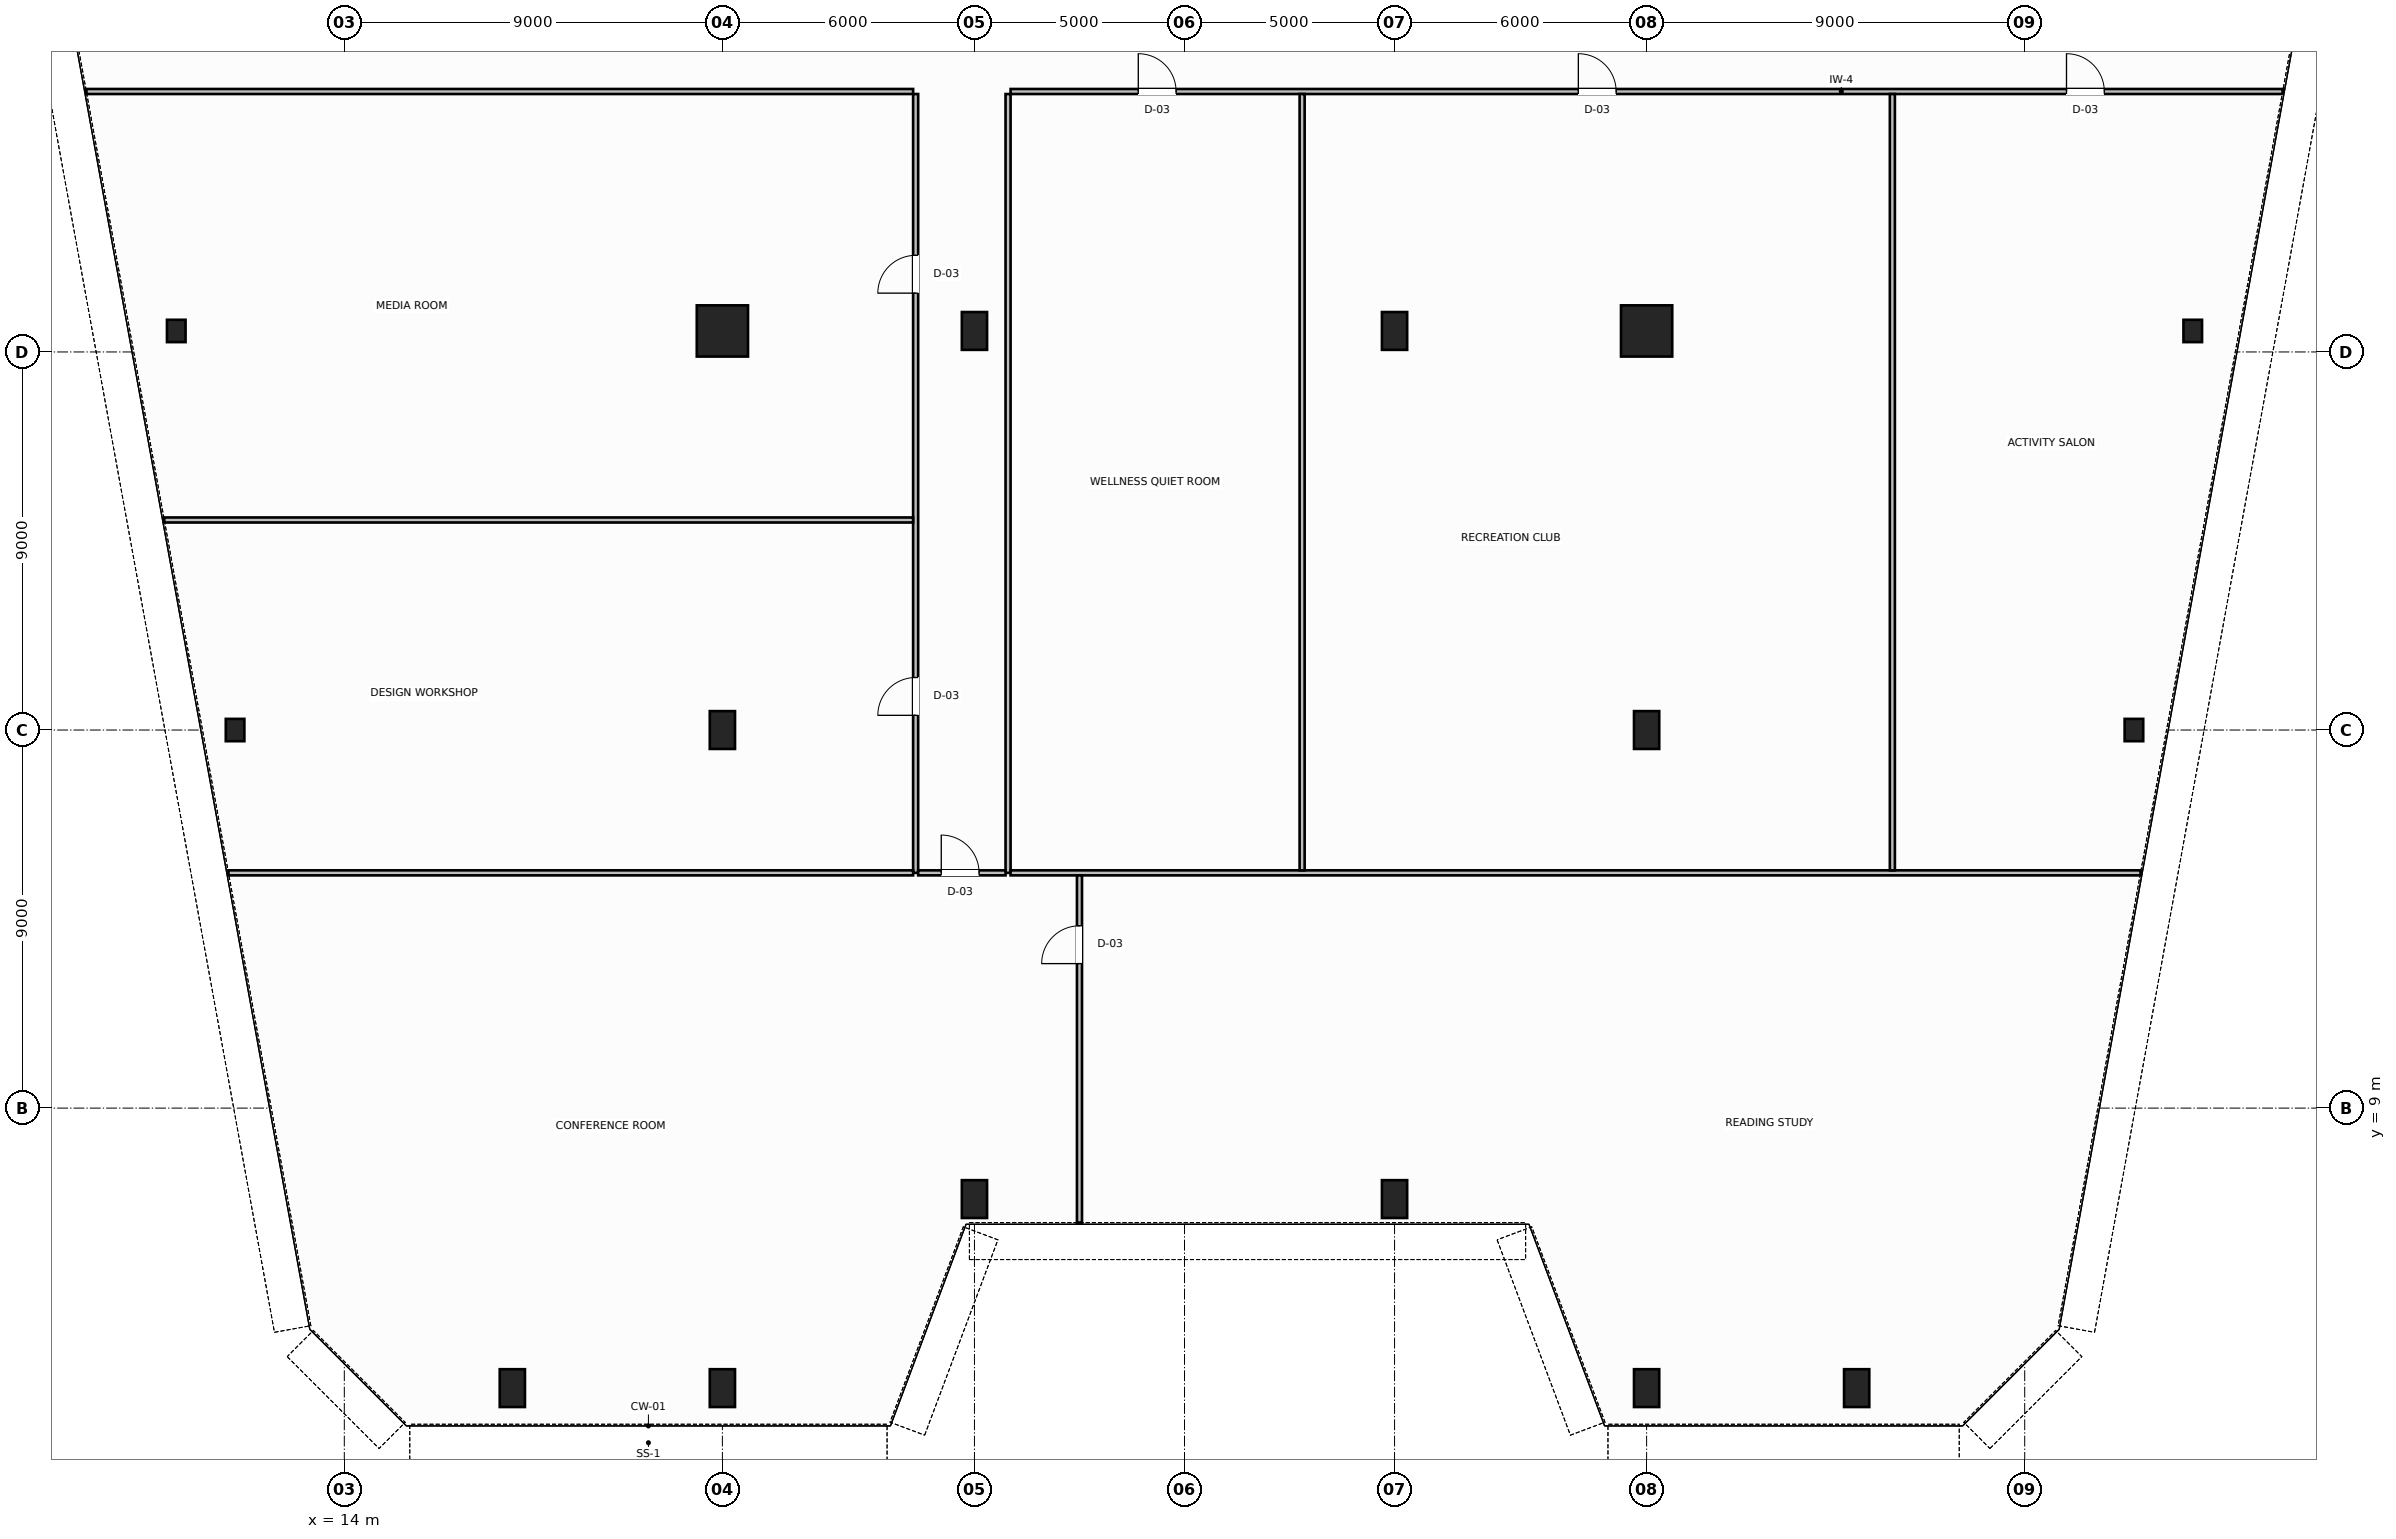
"""IFC4 building model, lengths in metres.
Left out: names, types, materials, properties, quantities, classifications, styles, units other than length and angle.
Written with IfcOpenShell. Run it as: python <this file> out.ifc"""

import sys

from ifc_helpers import new_model, si_unit, direction, frame, frame_2d, origin, origin_2d, place, context, subcontext, project, spatial, rectangle, hollow_rectangle, hollow_circle, i_section, extrude, source, transform, mapped, element, fill, save


model = new_model("IFC4")
c1 = context("Model", 3, precision=1e-05, world=origin(), true_north=direction((0.0, 1.0)))
c2 = subcontext(c1, "Body", "Model", "MODEL_VIEW")
j1 = project(units=[si_unit("LENGTHUNIT", "METRE"), si_unit("PLANEANGLEUNIT", "RADIAN")], contexts=[c1])
p1 = place(None, origin())
s1 = spatial("IfcSite", under=j1, at=p1, CompositionType="ELEMENT")
p2 = place(p1, origin())
s2 = spatial("IfcBuilding", under=s1, at=p2, CompositionType="ELEMENT")
p3 = place(p2, frame((0.0, 0.0, 41.6)))
s3 = spatial("IfcBuildingStorey", under=s2, at=p3, CompositionType="ELEMENT", Elevation=41.6)
m1 = source(origin(), c2, "Body", "SweptSolid", [
    extrude(i_section(OverallWidth=0.442, OverallDepth=0.531, WebThickness=0.065, FlangeThickness=0.076, FilletRadius=0.015, at=origin_2d()), origin(), (0.0, 0.0, 1.0), 3.8),
])
for number, where, z_axis, x_axis in (
    (1, (10.0, 27.5, 0.0), (0.0, 0.0, 1.0), (1.0, 0.0, 0.0)),
    (2, (11.4, 18.0, 0.0), (0.0, 0.0, 1.0), (1.0, 0.0, 0.0)),
    (3, (58.0, 27.5, 0.0), (0.0, 0.0, 1.0), (1.0, 0.0, 0.0)),
    (4, (56.6, 18.0, 0.0), (0.0, 0.0, 1.0), (1.0, 0.0, 0.0)),
):
    element("IfcColumn", number, at=place(p3, frame(where, z_axis=z_axis, x_axis=x_axis)), inside=s3, PredefinedType="COLUMN", context=c2, shape_type="MappedRepresentation", body=[
        mapped(m1, transform((0.0, 0.0, 0.0), scale=1.0)),
    ])
m2 = source(origin(), c2, "Body", "SweptSolid", [
    extrude(hollow_circle(Radius=0.61, WallThickness=0.05, at=origin_2d()), origin(), (0.0, 0.0, 1.0), 3.8),
])
p4 = place(p3, frame((23.0, 27.5, 0.0), z_axis=(0.0, 0.0, 1.0), x_axis=(1.0, 0.0, 0.0)))
e5 = element("IfcColumn", 5, at=p4, inside=s3, PredefinedType="COLUMN", context=c2, shape_type="MappedRepresentation", body=[
    mapped(m2, transform((0.0, 0.0, 0.0), scale=1.0)),
])
m3 = source(origin(), c2, "Body", "SweptSolid", [
    extrude(hollow_rectangle(XDim=0.6, YDim=0.9, WallThickness=0.04, InnerFilletRadius=0.04, OuterFilletRadius=0.08, at=origin_2d()), origin(), (0.0, 0.0, 1.0), 3.8),
])
for number, where, z_axis, x_axis in (
    (6, (29.0, 27.5, 0.0), (0.0, 0.0, 1.0), (1.0, 0.0, 0.0)),
    (7, (39.0, 27.5, 0.0), (0.0, 0.0, 1.0), (1.0, 0.0, 0.0)),
):
    element("IfcColumn", number, at=place(p3, frame(where, z_axis=z_axis, x_axis=x_axis)), inside=s3, PredefinedType="COLUMN", context=c2, shape_type="MappedRepresentation", body=[
        mapped(m3, transform((0.0, 0.0, 0.0), scale=1.0)),
    ])
p5 = place(p3, frame((45.0, 27.5, 0.0), z_axis=(0.0, 0.0, 1.0), x_axis=(1.0, 0.0, 0.0)))
e8 = element("IfcColumn", 8, at=p5, inside=s3, PredefinedType="COLUMN", context=c2, shape_type="MappedRepresentation", body=[
    mapped(m2, transform((0.0, 0.0, 0.0), scale=1.0)),
])
for number, where, z_axis, x_axis in (
    (9, (23.0, 18.0, 0.0), (0.0, 0.0, 1.0), (1.0, 0.0, 0.0)),
    (10, (45.0, 18.0, 0.0), (0.0, 0.0, 1.0), (1.0, 0.0, 0.0)),
):
    element("IfcColumn", number, at=place(p3, frame(where, z_axis=z_axis, x_axis=x_axis)), inside=s3, PredefinedType="COLUMN", context=c2, shape_type="MappedRepresentation", body=[
        mapped(m3, transform((0.0, 0.0, 0.0), scale=1.0)),
    ])
m4 = source(origin(), c2, "Body", "SweptSolid", [
    extrude(hollow_rectangle(XDim=0.6, YDim=0.9, WallThickness=0.04, InnerFilletRadius=0.04, OuterFilletRadius=0.08, at=origin_2d()), origin(), (0.0, 0.0, 1.0), 3.743),
])
for number, where, z_axis, x_axis in (
    (11, (18.0, 2.334, 0.032), (0.0, 0.064, 0.998), (-1.0, 0.0, 0.0)),
    (12, (23.0, 2.334, 0.032), (0.0, 0.064, 0.998), (-1.0, 0.0, 0.0)),
    (13, (29.0, 6.834, 0.032), (0.0, 0.064, 0.998), (-1.0, 0.0, 0.0)),
    (14, (39.0, 6.834, 0.032), (0.0, 0.064, 0.998), (-1.0, 0.0, 0.0)),
    (15, (45.0, 2.334, 0.032), (0.0, 0.064, 0.998), (-1.0, 0.0, 0.0)),
    (16, (50.0, 2.334, 0.032), (0.0, 0.064, 0.998), (-1.0, 0.0, 0.0)),
):
    element("IfcColumn", number, at=place(p3, frame(where, z_axis=z_axis, x_axis=x_axis)), inside=s3, PredefinedType="COLUMN", context=c2, shape_type="MappedRepresentation", body=[
        mapped(m4, transform((0.0, 0.0, 0.0), scale=1.0)),
    ])
p6 = place(p3, frame((7.859, 33.2, 0.0), z_axis=(0.0, 0.0, 1.0), x_axis=(1.0, 0.0, 0.0)))
e17 = element("IfcWall", 17, at=p6, inside=s3, PredefinedType="PARTITIONING", context=c2, shape_type="SweptSolid", body=[
    extrude(rectangle(XDim=19.681, YDim=0.12, at=frame_2d((9.84, 0.0))), origin(), (0.0, 0.0, 1.0), 3.58),
])
p7 = place(p3, frame((29.86, 33.2, 0.0), z_axis=(0.0, 0.0, 1.0), x_axis=(1.0, 0.0, 0.0)))
e18 = element("IfcWall", 18, at=p7, inside=s3, PredefinedType="PARTITIONING", context=c2, shape_type="SweptSolid", body=[
    extrude(rectangle(XDim=30.281, YDim=0.12, at=frame_2d((15.14, 0.0))), origin(), (0.0, 0.0, 1.0), 3.58),
])
p8 = place(p7, frame((3.04, 0.0, 0.0)))
e19 = element("IfcOpeningElement", 19, at=p8, cuts=e18, PredefinedType="OPENING", context=c2, shape_type="SweptSolid", body=[
    extrude(rectangle(XDim=0.9, YDim=2.15, at=frame_2d((0.45, 1.075))), frame((0.0, 0.07, 0.0), z_axis=(0.0, -1.0, 0.0), x_axis=(1.0, 0.0, 0.0)), (0.0, 0.0, 1.0), 0.14),
])
p9 = place(p7, frame((13.515, 0.0, 0.0)))
e20 = element("IfcOpeningElement", 20, at=p9, cuts=e18, PredefinedType="OPENING", context=c2, shape_type="SweptSolid", body=[
    extrude(rectangle(XDim=0.9, YDim=2.15, at=frame_2d((0.45, 1.075))), frame((0.0, 0.07, 0.0), z_axis=(0.0, -1.0, 0.0), x_axis=(1.0, 0.0, 0.0)), (0.0, 0.0, 1.0), 0.14),
])
p10 = place(p7, frame((25.135, 0.0, 0.0)))
e21 = element("IfcOpeningElement", 21, at=p10, cuts=e18, PredefinedType="OPENING", context=c2, shape_type="SweptSolid", body=[
    extrude(rectangle(XDim=0.9, YDim=2.15, at=frame_2d((0.45, 1.075))), frame((0.0, 0.07, 0.0), z_axis=(0.0, -1.0, 0.0), x_axis=(1.0, 0.0, 0.0)), (0.0, 0.0, 1.0), 0.14),
])
p11 = place(p3, frame((27.6, 14.6, 0.0), z_axis=(0.0, 0.0, 1.0), x_axis=(0.0, 1.0, 0.0)))
e22 = element("IfcWall", 22, at=p11, inside=s3, PredefinedType="PARTITIONING", context=c2, shape_type="SweptSolid", body=[
    extrude(rectangle(XDim=18.54, YDim=0.12, at=frame_2d((9.27, 0.0))), origin(), (0.0, 0.0, 1.0), 3.58),
])
p12 = place(p11, frame((3.75, 0.0, 0.0)))
e23 = element("IfcOpeningElement", 23, at=p12, cuts=e22, PredefinedType="OPENING", context=c2, shape_type="SweptSolid", body=[
    extrude(rectangle(XDim=0.9, YDim=2.15, at=frame_2d((0.45, 1.075))), frame((0.0, 0.07, 0.0), z_axis=(0.0, -1.0, 0.0), x_axis=(1.0, 0.0, 0.0)), (0.0, 0.0, 1.0), 0.14),
])
p13 = place(p11, frame((13.8, 0.0, 0.0)))
e24 = element("IfcOpeningElement", 24, at=p13, cuts=e22, PredefinedType="OPENING", context=c2, shape_type="SweptSolid", body=[
    extrude(rectangle(XDim=0.9, YDim=2.15, at=frame_2d((0.45, 1.075))), frame((0.0, 0.07, 0.0), z_axis=(0.0, -1.0, 0.0), x_axis=(1.0, 0.0, 0.0)), (0.0, 0.0, 1.0), 0.14),
])
p14 = place(p3, frame((29.8, 14.6, 0.0), z_axis=(0.0, 0.0, 1.0), x_axis=(0.0, 1.0, 0.0)))
e25 = element("IfcWall", 25, at=p14, inside=s3, PredefinedType="PARTITIONING", context=c2, shape_type="SweptSolid", body=[
    extrude(rectangle(XDim=18.54, YDim=0.12, at=frame_2d((9.27, 0.0))), origin(), (0.0, 0.0, 1.0), 3.58),
])
p15 = place(p3, frame((27.66, 14.6, 0.0), z_axis=(0.0, 0.0, 1.0), x_axis=(1.0, 0.0, 0.0)))
e26 = element("IfcWall", 26, at=p15, inside=s3, PredefinedType="PARTITIONING", context=c2, shape_type="SweptSolid", body=[
    extrude(rectangle(XDim=2.08, YDim=0.12, at=frame_2d((1.04, 0.0))), origin(), (0.0, 0.0, 1.0), 3.58),
])
p16 = place(p15, frame((0.55, 0.0, 0.0)))
e27 = element("IfcOpeningElement", 27, at=p16, cuts=e26, PredefinedType="OPENING", context=c2, shape_type="SweptSolid", body=[
    extrude(rectangle(XDim=0.9, YDim=2.15, at=frame_2d((0.45, 1.075))), frame((0.0, 0.07, 0.0), z_axis=(0.0, -1.0, 0.0), x_axis=(1.0, 0.0, 0.0)), (0.0, 0.0, 1.0), 0.14),
])
p17 = place(p3, frame((11.242, 14.6, 0.0), z_axis=(0.0, 0.0, 1.0), x_axis=(1.0, 0.0, 0.0)))
e28 = element("IfcWall", 28, at=p17, inside=s3, PredefinedType="PARTITIONING", context=c2, shape_type="SweptSolid", body=[
    extrude(rectangle(XDim=16.298, YDim=0.12, at=frame_2d((8.149, 0.0))), origin(), (0.0, 0.0, 1.0), 3.58),
])
p18 = place(p3, frame((29.86, 14.6, 0.0), z_axis=(0.0, 0.0, 1.0), x_axis=(1.0, 0.0, 0.0)))
e29 = element("IfcWall", 29, at=p18, inside=s3, PredefinedType="PARTITIONING", context=c2, shape_type="SweptSolid", body=[
    extrude(rectangle(XDim=26.898, YDim=0.12, at=frame_2d((13.449, 0.0))), origin(), (0.0, 0.0, 1.0), 3.58),
])
p19 = place(p3, frame((31.5, 6.274, 0.0), z_axis=(0.0, 0.0, 1.0), x_axis=(0.0, 1.0, 0.0)))
e30 = element("IfcWall", 30, at=p19, inside=s3, PredefinedType="PARTITIONING", context=c2, shape_type="SweptSolid", body=[
    extrude(rectangle(XDim=8.266, YDim=0.12, at=frame_2d((4.133, 0.0))), origin(), (0.0, 0.0, 1.0), 3.58),
])
p20 = place(p19, frame((6.165, 0.0, 0.0)))
e31 = element("IfcOpeningElement", 31, at=p20, cuts=e30, PredefinedType="OPENING", context=c2, shape_type="SweptSolid", body=[
    extrude(rectangle(XDim=0.9, YDim=2.15, at=frame_2d((0.45, 1.075))), frame((0.0, 0.07, 0.0), z_axis=(0.0, -1.0, 0.0), x_axis=(1.0, 0.0, 0.0)), (0.0, 0.0, 1.0), 0.14),
])
p21 = place(p3, frame((9.714, 23.0, 0.0), z_axis=(0.0, 0.0, 1.0), x_axis=(1.0, 0.0, 0.0)))
e32 = element("IfcWall", 32, at=p21, inside=s3, PredefinedType="PARTITIONING", context=c2, shape_type="SweptSolid", body=[
    extrude(rectangle(XDim=17.826, YDim=0.12, at=frame_2d((8.913, 0.0))), origin(), (0.0, 0.0, 1.0), 3.58),
])
for number, where, z_axis, x_axis in (
    (33, (36.8, 14.66, 0.0), (0.0, 0.0, 1.0), (0.0, 1.0, 0.0)),
    (34, (50.85, 14.66, 0.0), (0.0, 0.0, 1.0), (0.0, 1.0, 0.0)),
):
    element("IfcWall", number, at=place(p3, frame(where, z_axis=z_axis, x_axis=x_axis)), inside=s3, PredefinedType="PARTITIONING", context=c2, shape_type="SweptSolid", body=[
        extrude(rectangle(XDim=18.48, YDim=0.12, at=frame_2d((9.24, 0.0))), origin(), (0.0, 0.0, 1.0), 3.58),
    ])
m5 = source(origin(), c2, "Body", "SweptSolid", [
    extrude(rectangle(XDim=0.9, YDim=2.15, at=frame_2d((0.45, 1.075))), frame((0.0, 0.025, 0.0), z_axis=(0.0, -1.0, 0.0), x_axis=(1.0, 0.0, 0.0)), (0.0, 0.0, 1.0), 0.05),
])
p22 = place(p16, origin())
e35 = element("IfcDoor", 35, at=p22, inside=s3, OperationType="SINGLE_SWING_LEFT", PredefinedType="DOOR", context=c2, shape_type="MappedRepresentation", body=[
    mapped(m5, transform((0.0, 0.0, 0.0), scale=1.0)),
])
fill(e27, e35)
p23 = place(p20, origin())
e36 = element("IfcDoor", 36, at=p23, inside=s3, OperationType="SINGLE_SWING_RIGHT", PredefinedType="DOOR", context=c2, shape_type="MappedRepresentation", body=[
    mapped(m5, transform((0.0, 0.0, 0.0), scale=1.0)),
])
fill(e31, e36)
p24 = place(p12, origin())
e37 = element("IfcDoor", 37, at=p24, inside=s3, OperationType="SINGLE_SWING_LEFT", PredefinedType="DOOR", context=c2, shape_type="MappedRepresentation", body=[
    mapped(m5, transform((0.0, 0.0, 0.0), scale=1.0)),
])
fill(e23, e37)
p25 = place(p13, origin())
e38 = element("IfcDoor", 38, at=p25, inside=s3, OperationType="SINGLE_SWING_RIGHT", PredefinedType="DOOR", context=c2, shape_type="MappedRepresentation", body=[
    mapped(m5, transform((0.0, 0.0, 0.0), scale=1.0)),
])
fill(e24, e38)
p26 = place(p8, origin())
e39 = element("IfcDoor", 39, at=p26, inside=s3, OperationType="SINGLE_SWING_RIGHT", PredefinedType="DOOR", context=c2, shape_type="MappedRepresentation", body=[
    mapped(m5, transform((0.0, 0.0, 0.0), scale=1.0)),
])
fill(e19, e39)
p27 = place(p9, origin())
e40 = element("IfcDoor", 40, at=p27, inside=s3, OperationType="SINGLE_SWING_LEFT", PredefinedType="DOOR", context=c2, shape_type="MappedRepresentation", body=[
    mapped(m5, transform((0.0, 0.0, 0.0), scale=1.0)),
])
fill(e20, e40)
p28 = place(p10, origin())
e41 = element("IfcDoor", 41, at=p28, inside=s3, OperationType="SINGLE_SWING_RIGHT", PredefinedType="DOOR", context=c2, shape_type="MappedRepresentation", body=[
    mapped(m5, transform((0.0, 0.0, 0.0), scale=1.0)),
])
fill(e21, e41)
save(model, sys.argv[1])
